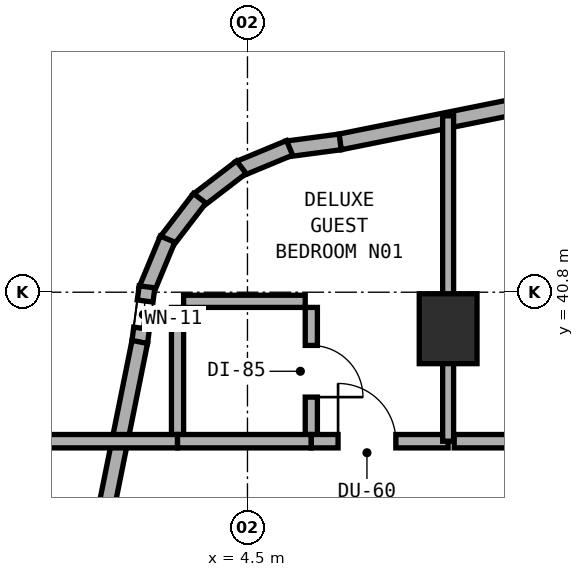
"""IFC4 building model, lengths in metres.
Left out: names, types, materials, properties, quantities, classifications, styles, units other than length and angle.
Written with IfcOpenShell. Run it as: python <this file> out.ifc"""

import sys

from ifc_helpers import new_model, si_unit, direction, frame, frame_2d, origin, origin_2d, place, context, subcontext, project, spatial, rectangle, extrude, element, fill, save


model = new_model("IFC4")
c1 = context("Model", 3, precision=1e-05, world=origin(), true_north=direction((0.0, 1.0)))
c2 = subcontext(c1, "Body", "Model", "MODEL_VIEW")
j1 = project(units=[si_unit("LENGTHUNIT", "METRE"), si_unit("PLANEANGLEUNIT", "RADIAN")], contexts=[c1])
p1 = place(None, origin())
s1 = spatial("IfcSite", under=j1, at=p1, CompositionType="ELEMENT")
p2 = place(p1, origin())
s2 = spatial("IfcBuilding", under=s1, at=p2, CompositionType="ELEMENT")
p3 = place(p2, frame((0.0, 0.0, 95.0)))
s3 = spatial("IfcBuildingStorey", under=s2, at=p3, CompositionType="ELEMENT", Elevation=95.0)
p4 = place(p3, frame((7.8, 40.2, 0.0), z_axis=(0.0, 0.0, 1.0), x_axis=(1.0, 0.0, 0.0)))
e1 = element("IfcColumn", 1, at=p4, inside=s3, PredefinedType="COLUMN", context=c2, shape_type="SweptSolid", body=[
    extrude(rectangle(XDim=0.95, YDim=1.15, at=origin_2d()), origin(), (0.0, 0.0, 1.0), 3.5),
])
p5 = place(p3, frame((14.991, 45.078, 0.0), z_axis=(0.0, 0.0, 1.0), x_axis=(-0.980321298532, -0.197408590603, 0.0)))
e2 = element("IfcWall", 2, at=p5, inside=s3, PredefinedType="STANDARD", context=c2, shape_type="SweptSolid", body=[
    extrude(rectangle(XDim=9.153, YDim=0.26, at=frame_2d((4.577, 0.0))), origin(), (0.0, 0.0, 1.0), 3.22),
])
p6 = place(p5, frame((2.431, 0.0, 0.8)))
e3 = element("IfcOpeningElement", 3, at=p6, cuts=e2, PredefinedType="OPENING", context=c2, shape_type="SweptSolid", body=[
    extrude(rectangle(XDim=2.4, YDim=1.6, at=frame_2d((1.2, 0.8))), frame((0.0, 0.14, 0.0), z_axis=(0.0, -1.0, 0.0), x_axis=(1.0, 0.0, 0.0)), (0.0, 0.0, 1.0), 0.28),
])
p7 = place(p3, frame((6.025, 43.272, 0.0), z_axis=(0.0, 0.0, 1.0), x_axis=(-0.991388484223, -0.130953706898, 0.0)))
e4 = element("IfcWall", 4, at=p7, inside=s3, PredefinedType="STANDARD", context=c2, shape_type="SweptSolid", body=[
    extrude(rectangle(XDim=0.885, YDim=0.26, at=frame_2d((0.443, 0.0))), origin(), (0.0, 0.0, 1.0), 3.22),
])
p8 = place(p3, frame((5.193, 43.174, 0.0), z_axis=(0.0, 0.0, 1.0), x_axis=(-0.923627776508, -0.383290660547, 0.0)))
e5 = element("IfcWall", 5, at=p8, inside=s3, PredefinedType="STANDARD", context=c2, shape_type="SweptSolid", body=[
    extrude(rectangle(XDim=0.903, YDim=0.26, at=frame_2d((0.452, 0.0))), origin(), (0.0, 0.0, 1.0), 3.22),
])
p9 = place(p3, frame((4.399, 42.856, 0.0), z_axis=(0.0, 0.0, 1.0), x_axis=(-0.793458244748, -0.608624690463, 0.0)))
e6 = element("IfcWall", 6, at=p9, inside=s3, PredefinedType="STANDARD", context=c2, shape_type="SweptSolid", body=[
    extrude(rectangle(XDim=0.902, YDim=0.26, at=frame_2d((0.451, 0.0))), origin(), (0.0, 0.0, 1.0), 3.22),
])
p10 = place(p3, frame((3.714, 42.345, 0.0), z_axis=(0.0, 0.0, 1.0), x_axis=(-0.608494022858, -0.793558456666, 0.0)))
e7 = element("IfcWall", 7, at=p10, inside=s3, PredefinedType="STANDARD", context=c2, shape_type="SweptSolid", body=[
    extrude(rectangle(XDim=0.902, YDim=0.26, at=frame_2d((0.451, 0.0))), origin(), (0.0, 0.0, 1.0), 3.22),
])
p11 = place(p3, frame((3.186, 41.673, 0.0), z_axis=(0.0, 0.0, 1.0), x_axis=(-0.383155708213, -0.923683767999, 0.0)))
e8 = element("IfcWall", 8, at=p11, inside=s3, PredefinedType="STANDARD", context=c2, shape_type="SweptSolid", body=[
    extrude(rectangle(XDim=0.903, YDim=0.26, at=frame_2d((0.451, 0.0))), origin(), (0.0, 0.0, 1.0), 3.22),
])
p12 = place(p3, frame((2.848, 40.888, 0.0), z_axis=(0.0, 0.0, 1.0), x_axis=(-0.130200706103, -0.991487658083, 0.0)))
e9 = element("IfcWall", 9, at=p12, inside=s3, PredefinedType="STANDARD", context=c2, shape_type="SweptSolid", body=[
    extrude(rectangle(XDim=0.921, YDim=0.26, at=frame_2d((0.46, 0.0))), origin(), (0.0, 0.0, 1.0), 3.22),
])
p13 = place(p12, frame((0.235, 0.0, 0.85)))
e10 = element("IfcOpeningElement", 10, at=p13, cuts=e9, PredefinedType="OPENING", context=c2, shape_type="SweptSolid", body=[
    extrude(rectangle(XDim=0.45, YDim=1.5, at=frame_2d((0.225, 0.75))), frame((0.0, 0.14, 0.0), z_axis=(0.0, -1.0, 0.0), x_axis=(1.0, 0.0, 0.0)), (0.0, 0.0, 1.0), 0.28),
])
p14 = place(p3, frame((2.729, 39.982, 0.0), z_axis=(0.0, 0.0, 1.0), x_axis=(-0.197435082048, -0.980315963543, 0.0)))
e11 = element("IfcWall", 11, at=p14, inside=s3, PredefinedType="STANDARD", context=c2, shape_type="SweptSolid", body=[
    extrude(rectangle(XDim=9.183, YDim=0.26, at=frame_2d((4.591, 0.0))), origin(), (0.0, 0.0, 1.0), 3.22),
])
p15 = place(p14, frame((4.286, 0.0, 0.8)))
e12 = element("IfcOpeningElement", 12, at=p15, cuts=e11, PredefinedType="OPENING", context=c2, shape_type="SweptSolid", body=[
    extrude(rectangle(XDim=2.4, YDim=1.6, at=frame_2d((1.2, 0.8))), frame((0.0, 0.14, 0.0), z_axis=(0.0, -1.0, 0.0), x_axis=(1.0, 0.0, 0.0)), (0.0, 0.0, 1.0), 0.28),
])
p16 = place(p3, frame((5.55, 38.45, 0.0), z_axis=(0.0, 0.0, 1.0), x_axis=(0.0, 1.0, 0.0)))
e13 = element("IfcWall", 13, at=p16, inside=s3, PredefinedType="PLUMBINGWALL", context=c2, shape_type="SweptSolid", body=[
    extrude(rectangle(XDim=2.1, YDim=0.2, at=frame_2d((1.05, 0.0))), origin(), (0.0, 0.0, 1.0), 3.22),
])
p17 = place(p16, frame((0.625, 0.0, 0.0)))
e14 = element("IfcOpeningElement", 14, at=p17, cuts=e13, PredefinedType="OPENING", context=c2, shape_type="SweptSolid", body=[
    extrude(rectangle(XDim=0.85, YDim=2.1, at=frame_2d((0.425, 1.05))), frame((0.0, 0.11, 0.0), z_axis=(0.0, -1.0, 0.0), x_axis=(1.0, 0.0, 0.0)), (0.0, 0.0, 1.0), 0.22),
])
p18 = place(p3, frame((3.45, 40.65, 0.0), z_axis=(0.0, 0.0, 1.0), x_axis=(1.0, 0.0, 0.0)))
e15 = element("IfcWall", 15, at=p18, inside=s3, PredefinedType="PLUMBINGWALL", context=c2, shape_type="SweptSolid", body=[
    extrude(rectangle(XDim=2.0, YDim=0.2, at=frame_2d((1.0, 0.0))), origin(), (0.0, 0.0, 1.0), 3.22),
])
p19 = place(p3, frame((3.35, 38.45, 0.0), z_axis=(0.0, 0.0, 1.0), x_axis=(0.0, 1.0, 0.0)))
e16 = element("IfcWall", 16, at=p19, inside=s3, PredefinedType="PLUMBINGWALL", context=c2, shape_type="SweptSolid", body=[
    extrude(rectangle(XDim=2.1, YDim=0.2, at=frame_2d((1.05, 0.0))), origin(), (0.0, 0.0, 1.0), 3.22),
])
p20 = place(p3, frame((0.96, 38.35, 0.0), z_axis=(0.0, 0.0, 1.0), x_axis=(1.0, 0.0, 0.0)))
e17 = element("IfcWall", 17, at=p20, inside=s3, PredefinedType="SOLIDWALL", context=c2, shape_type="SweptSolid", body=[
    extrude(rectangle(XDim=2.39, YDim=0.22, at=frame_2d((1.195, 0.0))), origin(), (0.0, 0.0, 1.0), 3.22),
])
p21 = place(p3, frame((3.35, 38.35, 0.0), z_axis=(0.0, 0.0, 1.0), x_axis=(1.0, 0.0, 0.0)))
e18 = element("IfcWall", 18, at=p21, inside=s3, PredefinedType="SOLIDWALL", context=c2, shape_type="SweptSolid", body=[
    extrude(rectangle(XDim=2.2, YDim=0.22, at=frame_2d((1.1, 0.0))), origin(), (0.0, 0.0, 1.0), 3.22),
])
p22 = place(p3, frame((5.55, 38.35, 0.0), z_axis=(0.0, 0.0, 1.0), x_axis=(1.0, 0.0, 0.0)))
e19 = element("IfcWall", 19, at=p22, inside=s3, PredefinedType="SOLIDWALL", context=c2, shape_type="SweptSolid", body=[
    extrude(rectangle(XDim=2.25, YDim=0.22, at=frame_2d((1.125, 0.0))), origin(), (0.0, 0.0, 1.0), 2.595),
])
p23 = place(p22, frame((0.44, 0.0, 0.0)))
e20 = element("IfcOpeningElement", 20, at=p23, cuts=e19, PredefinedType="OPENING", context=c2, shape_type="SweptSolid", body=[
    extrude(rectangle(XDim=0.95, YDim=2.1, at=frame_2d((0.475, 1.05))), frame((0.0, 0.12, 0.0), z_axis=(0.0, -1.0, 0.0), x_axis=(1.0, 0.0, 0.0)), (0.0, 0.0, 1.0), 0.24),
])
p24 = place(p3, frame((7.8, 38.35, 0.0), z_axis=(0.0, 0.0, 1.0), x_axis=(0.0, 1.0, 0.0)))
e21 = element("IfcWall", 21, at=p24, inside=s3, PredefinedType="SOLIDWALL", context=c2, shape_type="SweptSolid", body=[
    extrude(rectangle(XDim=5.351, YDim=0.18, at=frame_2d((2.675, 0.0))), origin(), (0.0, 0.0, 1.0), 2.595),
])
p25 = place(p3, frame((7.9, 38.35, 0.0), z_axis=(0.0, 0.0, 1.0), x_axis=(1.0, 0.0, 0.0)))
e22 = element("IfcWall", 22, at=p25, inside=s3, PredefinedType="SOLIDWALL", context=c2, shape_type="SweptSolid", body=[
    extrude(rectangle(XDim=8.2, YDim=0.22, at=frame_2d((4.1, 0.0))), origin(), (0.0, 0.0, 1.0), 3.22),
])
p26 = place(p25, frame((3.252, 0.0, 0.0)))
e23 = element("IfcOpeningElement", 23, at=p26, cuts=e22, PredefinedType="OPENING", context=c2, shape_type="SweptSolid", body=[
    extrude(rectangle(XDim=0.95, YDim=2.1, at=frame_2d((0.475, 1.05))), frame((0.0, 0.12, 0.0), z_axis=(0.0, -1.0, 0.0), x_axis=(1.0, 0.0, 0.0)), (0.0, 0.0, 1.0), 0.24),
])
p27 = place(p13, origin())
e24 = element("IfcWindow", 24, at=p27, inside=s3, PartitioningType="SINGLE_PANEL", PredefinedType="WINDOW", context=c2, shape_type="SweptSolid", body=[
    extrude(rectangle(XDim=0.45, YDim=1.5, at=frame_2d((0.225, 0.75))), frame((0.0, 0.03, 0.0), z_axis=(0.0, -1.0, 0.0), x_axis=(1.0, 0.0, 0.0)), (0.0, 0.0, 1.0), 0.06),
])
fill(e10, e24)
p28 = place(p17, frame((0.85, 0.0, 0.0), z_axis=(0.0, 0.0, 1.0), x_axis=(-1.0, 0.0, 0.0)))
e25 = element("IfcDoor", 25, at=p28, inside=s3, OperationType="SINGLE_SWING_RIGHT", PredefinedType="DOOR", context=c2, shape_type="SweptSolid", body=[
    extrude(rectangle(XDim=0.85, YDim=2.1, at=frame_2d((0.425, 1.05))), frame((0.0, 0.025, 0.0), z_axis=(0.0, -1.0, 0.0), x_axis=(1.0, 0.0, 0.0)), (0.0, 0.0, 1.0), 0.05),
])
fill(e14, e25)
p29 = place(p23, origin())
e26 = element("IfcDoor", 26, at=p29, inside=s3, OperationType="SINGLE_SWING_LEFT", PredefinedType="DOOR", context=c2, shape_type="SweptSolid", body=[
    extrude(rectangle(XDim=0.95, YDim=2.1, at=frame_2d((0.475, 1.05))), frame((0.0, 0.025, 0.0), z_axis=(0.0, -1.0, 0.0), x_axis=(1.0, 0.0, 0.0)), (0.0, 0.0, 1.0), 0.05),
])
fill(e20, e26)
save(model, sys.argv[1])
